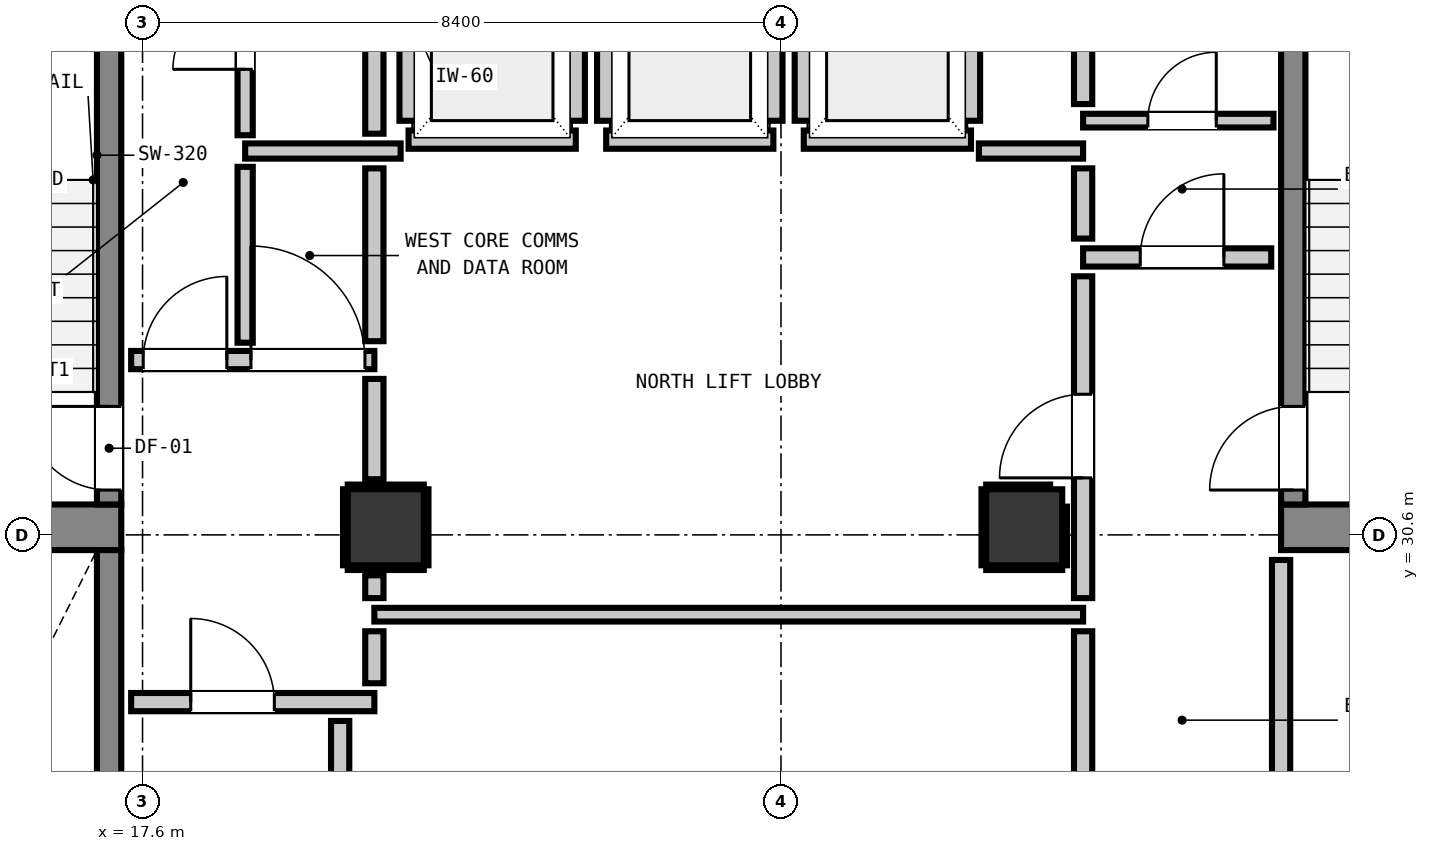
"""IFC4 building model, lengths in metres.
Left out: names, types, materials, properties, quantities, classifications, styles, units other than length and angle.
Written with IfcOpenShell. Run it as: python <this file> out.ifc"""

import sys

from ifc_helpers import new_model, si_unit, direction, frame, frame_2d, origin, origin_2d, place, context, subcontext, project, spatial, rectangle, extrude, element, fill, save


model = new_model("IFC4")
c1 = context("Model", 3, precision=1e-05, world=origin(), true_north=direction((0.0, 1.0)))
c2 = subcontext(c1, "Body", "Model", "MODEL_VIEW")
j1 = project(units=[si_unit("LENGTHUNIT", "METRE"), si_unit("PLANEANGLEUNIT", "RADIAN")], contexts=[c1])
p1 = place(None, origin())
s1 = spatial("IfcSite", under=j1, at=p1, CompositionType="ELEMENT")
p2 = place(p1, origin())
s2 = spatial("IfcBuilding", under=s1, at=p2, CompositionType="ELEMENT")
p3 = place(p2, frame((0.0, 0.0, 35.28)))
s3 = spatial("IfcBuildingStorey", under=s2, at=p3, CompositionType="ELEMENT", Elevation=35.28)
for number, where, z_axis, x_axis in (
    (1, (13.905, 30.7, 0.0), (0.0, 0.0, 1.0), (1.0, 0.0, 0.0)),
    (2, (32.58, 30.7, 0.0), (0.0, 0.0, 1.0), (1.0, 0.0, 0.0)),
):
    element("IfcWall", number, at=place(p3, frame(where, z_axis=z_axis, x_axis=x_axis)), inside=s3, PredefinedType="SHEAR", context=c2, shape_type="SweptSolid", body=[
        extrude(rectangle(XDim=3.415, YDim=0.6, at=frame_2d((1.708, 0.0))), origin(), (0.0, 0.0, 1.0), 3.32),
    ])
p4 = place(p3, frame((17.16, 31.0, 0.0), z_axis=(0.0, 0.0, 1.0), x_axis=(0.0, 1.0, 0.0)))
e3 = element("IfcWall", 3, at=p4, inside=s3, PredefinedType="SHEAR", context=c2, shape_type="SweptSolid", body=[
    extrude(rectangle(XDim=7.8, YDim=0.32, at=frame_2d((3.9, 0.0))), origin(), (0.0, 0.0, 1.0), 3.32),
])
p5 = place(p4, frame((0.19, 0.0, 0.0)))
e4 = element("IfcOpeningElement", 4, at=p5, cuts=e3, PredefinedType="OPENING", context=c2, shape_type="SweptSolid", body=[
    extrude(rectangle(XDim=1.1, YDim=2.15, at=frame_2d((0.55, 1.075))), frame((0.0, 0.17, 0.0), z_axis=(0.0, -1.0, 0.0), x_axis=(1.0, 0.0, 0.0)), (0.0, 0.0, 1.0), 0.34),
])
p6 = place(p3, frame((17.16, 22.6, 0.0), z_axis=(0.0, 0.0, 1.0), x_axis=(0.0, 1.0, 0.0)))
e5 = element("IfcWall", 5, at=p6, inside=s3, PredefinedType="SHEAR", context=c2, shape_type="SweptSolid", body=[
    extrude(rectangle(XDim=7.8, YDim=0.32, at=frame_2d((3.9, 0.0))), origin(), (0.0, 0.0, 1.0), 3.32),
])
p7 = place(p6, frame((0.19, 0.0, 0.0)))
e6 = element("IfcOpeningElement", 6, at=p7, cuts=e5, PredefinedType="OPENING", context=c2, shape_type="SweptSolid", body=[
    extrude(rectangle(XDim=1.1, YDim=2.15, at=frame_2d((0.55, 1.075))), frame((0.0, 0.17, 0.0), z_axis=(0.0, -1.0, 0.0), x_axis=(1.0, 0.0, 0.0)), (0.0, 0.0, 1.0), 0.34),
])
p8 = place(p3, frame((32.74, 31.0, 0.0), z_axis=(0.0, 0.0, 1.0), x_axis=(0.0, 1.0, 0.0)))
e7 = element("IfcWall", 7, at=p8, inside=s3, PredefinedType="SHEAR", context=c2, shape_type="SweptSolid", body=[
    extrude(rectangle(XDim=7.8, YDim=0.32, at=frame_2d((3.9, 0.0))), origin(), (0.0, 0.0, 1.0), 3.32),
])
p9 = place(p8, frame((0.19, 0.0, 0.0)))
e8 = element("IfcOpeningElement", 8, at=p9, cuts=e7, PredefinedType="OPENING", context=c2, shape_type="SweptSolid", body=[
    extrude(rectangle(XDim=1.1, YDim=2.15, at=frame_2d((0.55, 1.075))), frame((0.0, 0.17, 0.0), z_axis=(0.0, -1.0, 0.0), x_axis=(1.0, 0.0, 0.0)), (0.0, 0.0, 1.0), 0.34),
])
for number, where, z_axis, x_axis in (
    (9, (20.8, 30.7, 0.0), (0.0, 0.0, 1.0), (1.0, 0.0, 0.0)),
    (10, (29.2, 30.7, 0.0), (0.0, 0.0, 1.0), (1.0, 0.0, 0.0)),
):
    element("IfcColumn", number, at=place(p3, frame(where, z_axis=z_axis, x_axis=x_axis)), inside=s3, PredefinedType="COLUMN", context=c2, shape_type="SweptSolid", body=[
        extrude(rectangle(XDim=1.0, YDim=1.0, at=origin_2d()), origin(), (0.0, 0.0, 1.0), 3.32),
    ])
p10 = place(p3, frame((21.1, 35.8, 0.0), z_axis=(0.0, 0.0, 1.0), x_axis=(1.0, 0.0, 0.0)))
e11 = element("IfcWall", 11, at=p10, inside=s3, PredefinedType="PARTITIONING", context=c2, shape_type="SweptSolid", body=[
    extrude(rectangle(XDim=2.2, YDim=0.24, at=frame_2d((1.1, 0.0))), origin(), (0.0, 0.0, 1.0), 3.06),
])
p11 = place(p3, frame((21.1, 36.048, 0.0), z_axis=(0.0, 0.0, 1.0), x_axis=(0.0, 1.0, 0.0)))
e12 = element("IfcWall", 12, at=p11, inside=s3, PredefinedType="PARTITIONING", context=c2, shape_type="SweptSolid", body=[
    extrude(rectangle(XDim=2.104, YDim=0.24, at=frame_2d((1.052, 0.0))), origin(), (0.0, 0.0, 1.0), 2.295),
])
p12 = place(p3, frame((23.3, 36.048, 0.0), z_axis=(0.0, 0.0, 1.0), x_axis=(0.0, 1.0, 0.0)))
e13 = element("IfcWall", 13, at=p12, inside=s3, PredefinedType="PARTITIONING", context=c2, shape_type="SweptSolid", body=[
    extrude(rectangle(XDim=2.104, YDim=0.24, at=frame_2d((1.052, 0.0))), origin(), (0.0, 0.0, 1.0), 3.06),
])
p13 = place(p3, frame((23.7, 35.8, 0.0), z_axis=(0.0, 0.0, 1.0), x_axis=(1.0, 0.0, 0.0)))
e14 = element("IfcWall", 14, at=p13, inside=s3, PredefinedType="PARTITIONING", context=c2, shape_type="SweptSolid", body=[
    extrude(rectangle(XDim=2.2, YDim=0.24, at=frame_2d((1.1, 0.0))), origin(), (0.0, 0.0, 1.0), 3.06),
])
for number, where, z_axis, x_axis in (
    (15, (23.7, 36.048, 0.0), (0.0, 0.0, 1.0), (0.0, 1.0, 0.0)),
    (16, (25.9, 36.048, 0.0), (0.0, 0.0, 1.0), (0.0, 1.0, 0.0)),
):
    element("IfcWall", number, at=place(p3, frame(where, z_axis=z_axis, x_axis=x_axis)), inside=s3, PredefinedType="PARTITIONING", context=c2, shape_type="SweptSolid", body=[
        extrude(rectangle(XDim=2.104, YDim=0.24, at=frame_2d((1.052, 0.0))), origin(), (0.0, 0.0, 1.0), 3.06),
    ])
p14 = place(p3, frame((26.3, 35.8, 0.0), z_axis=(0.0, 0.0, 1.0), x_axis=(1.0, 0.0, 0.0)))
e17 = element("IfcWall", 17, at=p14, inside=s3, PredefinedType="PARTITIONING", context=c2, shape_type="SweptSolid", body=[
    extrude(rectangle(XDim=2.2, YDim=0.24, at=frame_2d((1.1, 0.0))), origin(), (0.0, 0.0, 1.0), 3.06),
])
for number, where, z_axis, x_axis in (
    (18, (26.3, 36.048, 0.0), (0.0, 0.0, 1.0), (0.0, 1.0, 0.0)),
    (19, (28.5, 36.048, 0.0), (0.0, 0.0, 1.0), (0.0, 1.0, 0.0)),
):
    element("IfcWall", number, at=place(p3, frame(where, z_axis=z_axis, x_axis=x_axis)), inside=s3, PredefinedType="PARTITIONING", context=c2, shape_type="SweptSolid", body=[
        extrude(rectangle(XDim=2.104, YDim=0.24, at=frame_2d((1.052, 0.0))), origin(), (0.0, 0.0, 1.0), 3.06),
    ])
p15 = place(p3, frame((17.45, 28.4, 0.0), z_axis=(0.0, 0.0, 1.0), x_axis=(1.0, 0.0, 0.0)))
e20 = element("IfcWall", 20, at=p15, inside=s3, PredefinedType="PARTITIONING", context=c2, shape_type="SweptSolid", body=[
    extrude(rectangle(XDim=3.2, YDim=0.24, at=frame_2d((1.6, 0.0))), origin(), (0.0, 0.0, 1.0), 3.06),
])
p16 = place(p15, frame((0.784, 0.0, 0.0)))
e21 = element("IfcOpeningElement", 21, at=p16, cuts=e20, PredefinedType="OPENING", context=c2, shape_type="SweptSolid", body=[
    extrude(rectangle(XDim=1.1, YDim=2.15, at=frame_2d((0.55, 1.075))), frame((0.0, 0.13, 0.0), z_axis=(0.0, -1.0, 0.0), x_axis=(1.0, 0.0, 0.0)), (0.0, 0.0, 1.0), 0.26),
])
p17 = place(p3, frame((17.45, 32.9, 0.0), z_axis=(0.0, 0.0, 1.0), x_axis=(1.0, 0.0, 0.0)))
e22 = element("IfcWall", 22, at=p17, inside=s3, PredefinedType="PARTITIONING", context=c2, shape_type="SweptSolid", body=[
    extrude(rectangle(XDim=3.2, YDim=0.24, at=frame_2d((1.6, 0.0))), origin(), (0.0, 0.0, 1.0), 3.06),
])
p18 = place(p17, frame((0.159, 0.0, 0.0)))
e23 = element("IfcOpeningElement", 23, at=p18, cuts=e22, PredefinedType="OPENING", context=c2, shape_type="SweptSolid", body=[
    extrude(rectangle(XDim=1.1, YDim=2.15, at=frame_2d((0.55, 1.075))), frame((0.0, 0.13, 0.0), z_axis=(0.0, -1.0, 0.0), x_axis=(1.0, 0.0, 0.0)), (0.0, 0.0, 1.0), 0.26),
])
p19 = place(p17, frame((1.576, 0.0, 0.0)))
e24 = element("IfcOpeningElement", 24, at=p19, cuts=e22, PredefinedType="OPENING", context=c2, shape_type="SweptSolid", body=[
    extrude(rectangle(XDim=1.5, YDim=2.15, at=frame_2d((0.75, 1.075))), frame((0.0, 0.13, 0.0), z_axis=(0.0, -1.0, 0.0), x_axis=(1.0, 0.0, 0.0)), (0.0, 0.0, 1.0), 0.26),
])
p20 = place(p3, frame((29.975, 34.25, 0.0), z_axis=(0.0, 0.0, 1.0), x_axis=(1.0, 0.0, 0.0)))
e25 = element("IfcWall", 25, at=p20, inside=s3, PredefinedType="PARTITIONING", context=c2, shape_type="SweptSolid", body=[
    extrude(rectangle(XDim=2.475, YDim=0.24, at=frame_2d((1.237, 0.0))), origin(), (0.0, 0.0, 1.0), 3.06),
])
p21 = place(p20, frame((0.752, 0.0, 0.0)))
e26 = element("IfcOpeningElement", 26, at=p21, cuts=e25, PredefinedType="OPENING", context=c2, shape_type="SweptSolid", body=[
    extrude(rectangle(XDim=1.1, YDim=2.15, at=frame_2d((0.55, 1.075))), frame((0.0, 0.13, 0.0), z_axis=(0.0, -1.0, 0.0), x_axis=(1.0, 0.0, 0.0)), (0.0, 0.0, 1.0), 0.26),
])
p22 = place(p3, frame((18.95, 35.65, 0.0), z_axis=(0.0, 0.0, 1.0), x_axis=(1.0, 0.0, 0.0)))
e27 = element("IfcWall", 27, at=p22, inside=s3, PredefinedType="PARTITIONING", context=c2, shape_type="SweptSolid", body=[
    extrude(rectangle(XDim=2.046, YDim=0.2, at=frame_2d((1.023, 0.0))), origin(), (0.0, 0.0, 1.0), 3.06),
])
p23 = place(p3, frame((28.604, 35.65, 0.0), z_axis=(0.0, 0.0, 1.0), x_axis=(1.0, 0.0, 0.0)))
e28 = element("IfcWall", 28, at=p23, inside=s3, PredefinedType="PARTITIONING", context=c2, shape_type="SweptSolid", body=[
    extrude(rectangle(XDim=1.371, YDim=0.2, at=frame_2d((0.686, 0.0))), origin(), (0.0, 0.0, 1.0), 3.06),
])
p24 = place(p3, frame((20.65, 29.55, 0.0), z_axis=(0.0, 0.0, 1.0), x_axis=(1.0, 0.0, 0.0)))
e29 = element("IfcWall", 29, at=p24, inside=s3, PredefinedType="PARTITIONING", context=c2, shape_type="SweptSolid", body=[
    extrude(rectangle(XDim=9.325, YDim=0.18, at=frame_2d((4.663, 0.0))), origin(), (0.0, 0.0, 1.0), 3.06),
])
p25 = place(p3, frame((29.975, 36.05, 0.0), z_axis=(0.0, 0.0, 1.0), x_axis=(1.0, 0.0, 0.0)))
e30 = element("IfcWall", 30, at=p25, inside=s3, PredefinedType="PARTITIONING", context=c2, shape_type="SweptSolid", body=[
    extrude(rectangle(XDim=2.505, YDim=0.18, at=frame_2d((1.252, 0.0))), origin(), (0.0, 0.0, 1.0), 3.06),
])
p26 = place(p25, frame((0.852, 0.0, 0.0)))
e31 = element("IfcOpeningElement", 31, at=p26, cuts=e30, PredefinedType="OPENING", context=c2, shape_type="SweptSolid", body=[
    extrude(rectangle(XDim=0.9, YDim=2.1, at=frame_2d((0.45, 1.05))), frame((0.0, 0.1, 0.0), z_axis=(0.0, -1.0, 0.0), x_axis=(1.0, 0.0, 0.0)), (0.0, 0.0, 1.0), 0.2),
])
p27 = place(p3, frame((20.2, 22.586, 0.0), z_axis=(0.0, 0.0, 1.0), x_axis=(0.0, 1.0, 0.0)))
e32 = element("IfcWall", 32, at=p27, inside=s3, PredefinedType="PARTITIONING", context=c2, shape_type="SweptSolid", body=[
    extrude(rectangle(XDim=5.566, YDim=0.24, at=frame_2d((2.783, 0.0))), origin(), (0.0, 0.0, 1.0), 3.06),
])
p28 = place(p3, frame((20.65, 28.648, 0.0), z_axis=(0.0, 0.0, 1.0), x_axis=(0.0, 1.0, 0.0)))
e33 = element("IfcWall", 33, at=p28, inside=s3, PredefinedType="PARTITIONING", context=c2, shape_type="SweptSolid", body=[
    extrude(rectangle(XDim=0.684, YDim=0.24, at=frame_2d((0.342, 0.0))), origin(), (0.0, 0.0, 1.0), 2.295),
])
p29 = place(p3, frame((20.65, 29.768, 0.0), z_axis=(0.0, 0.0, 1.0), x_axis=(0.0, 1.0, 0.0)))
e34 = element("IfcWall", 34, at=p29, inside=s3, PredefinedType="PARTITIONING", context=c2, shape_type="SweptSolid", body=[
    extrude(rectangle(XDim=0.3, YDim=0.24, at=frame_2d((0.15, 0.0))), origin(), (0.0, 0.0, 1.0), 2.295),
])
p30 = place(p3, frame((20.65, 31.332, 0.0), z_axis=(0.0, 0.0, 1.0), x_axis=(0.0, 1.0, 0.0)))
e35 = element("IfcWall", 35, at=p30, inside=s3, PredefinedType="PARTITIONING", context=c2, shape_type="SweptSolid", body=[
    extrude(rectangle(XDim=1.32, YDim=0.24, at=frame_2d((0.66, 0.0))), origin(), (0.0, 0.0, 1.0), 2.295),
])
p31 = place(p3, frame((20.65, 33.148, 0.0), z_axis=(0.0, 0.0, 1.0), x_axis=(0.0, 1.0, 0.0)))
e36 = element("IfcWall", 36, at=p31, inside=s3, PredefinedType="PARTITIONING", context=c2, shape_type="SweptSolid", body=[
    extrude(rectangle(XDim=2.274, YDim=0.24, at=frame_2d((1.137, 0.0))), origin(), (0.0, 0.0, 1.0), 2.295),
])
p32 = place(p3, frame((20.65, 35.878, 0.0), z_axis=(0.0, 0.0, 1.0), x_axis=(0.0, 1.0, 0.0)))
e37 = element("IfcWall", 37, at=p32, inside=s3, PredefinedType="PARTITIONING", context=c2, shape_type="SweptSolid", body=[
    extrude(rectangle(XDim=2.674, YDim=0.24, at=frame_2d((1.337, 0.0))), origin(), (0.0, 0.0, 1.0), 2.295),
])
p33 = place(p3, frame((29.975, 25.648, 0.0), z_axis=(0.0, 0.0, 1.0), x_axis=(0.0, 1.0, 0.0)))
e38 = element("IfcWall", 38, at=p33, inside=s3, PredefinedType="PARTITIONING", context=c2, shape_type="SweptSolid", body=[
    extrude(rectangle(XDim=3.684, YDim=0.24, at=frame_2d((1.842, 0.0))), origin(), (0.0, 0.0, 1.0), 3.06),
])
p34 = place(p3, frame((29.975, 29.768, 0.0), z_axis=(0.0, 0.0, 1.0), x_axis=(0.0, 1.0, 0.0)))
e39 = element("IfcWall", 39, at=p34, inside=s3, PredefinedType="PARTITIONING", context=c2, shape_type="SweptSolid", body=[
    extrude(rectangle(XDim=4.234, YDim=0.24, at=frame_2d((2.117, 0.0))), origin(), (0.0, 0.0, 1.0), 3.06),
])
p35 = place(p34, frame((1.582, 0.0, 0.0)))
e40 = element("IfcOpeningElement", 40, at=p35, cuts=e39, PredefinedType="OPENING", context=c2, shape_type="SweptSolid", body=[
    extrude(rectangle(XDim=1.1, YDim=2.15, at=frame_2d((0.55, 1.075))), frame((0.0, 0.13, 0.0), z_axis=(0.0, -1.0, 0.0), x_axis=(1.0, 0.0, 0.0)), (0.0, 0.0, 1.0), 0.26),
])
p36 = place(p3, frame((29.975, 34.498, 0.0), z_axis=(0.0, 0.0, 1.0), x_axis=(0.0, 1.0, 0.0)))
e41 = element("IfcWall", 41, at=p36, inside=s3, PredefinedType="PARTITIONING", context=c2, shape_type="SweptSolid", body=[
    extrude(rectangle(XDim=0.924, YDim=0.24, at=frame_2d((0.462, 0.0))), origin(), (0.0, 0.0, 1.0), 3.06),
])
p37 = place(p3, frame((29.975, 36.268, 0.0), z_axis=(0.0, 0.0, 1.0), x_axis=(0.0, 1.0, 0.0)))
e42 = element("IfcWall", 42, at=p37, inside=s3, PredefinedType="PARTITIONING", context=c2, shape_type="SweptSolid", body=[
    extrude(rectangle(XDim=2.284, YDim=0.24, at=frame_2d((1.142, 0.0))), origin(), (0.0, 0.0, 1.0), 3.06),
])
p38 = place(p3, frame((32.58, 25.648, 0.0), z_axis=(0.0, 0.0, 1.0), x_axis=(0.0, 1.0, 0.0)))
e43 = element("IfcWall", 43, at=p38, inside=s3, PredefinedType="PARTITIONING", context=c2, shape_type="SweptSolid", body=[
    extrude(rectangle(XDim=4.622, YDim=0.24, at=frame_2d((2.311, 0.0))), origin(), (0.0, 0.0, 1.0), 3.06),
])
p39 = place(p3, frame((18.95, 33.128, 0.0), z_axis=(0.0, 0.0, 1.0), x_axis=(0.0, 1.0, 0.0)))
e44 = element("IfcWall", 44, at=p39, inside=s3, PredefinedType="PARTITIONING", context=c2, shape_type="SweptSolid", body=[
    extrude(rectangle(XDim=2.314, YDim=0.2, at=frame_2d((1.157, 0.0))), origin(), (0.0, 0.0, 1.0), 3.06),
])
p40 = place(p3, frame((18.95, 35.858, 0.0), z_axis=(0.0, 0.0, 1.0), x_axis=(0.0, 1.0, 0.0)))
e45 = element("IfcWall", 45, at=p40, inside=s3, PredefinedType="PARTITIONING", context=c2, shape_type="SweptSolid", body=[
    extrude(rectangle(XDim=2.714, YDim=0.2, at=frame_2d((1.357, 0.0))), origin(), (0.0, 0.0, 1.0), 3.06),
])
p41 = place(p40, frame((0.867, 0.0, 0.0)))
e46 = element("IfcOpeningElement", 46, at=p41, cuts=e45, PredefinedType="OPENING", context=c2, shape_type="SweptSolid", body=[
    extrude(rectangle(XDim=0.95, YDim=2.1, at=frame_2d((0.475, 1.05))), frame((0.0, 0.11, 0.0), z_axis=(0.0, -1.0, 0.0), x_axis=(1.0, 0.0, 0.0)), (0.0, 0.0, 1.0), 0.22),
])
for number, where, z_axis, x_axis in (
    (47, (20.3, 30.168, 0.0), (0.0, 0.0, 1.0), (1.0, 0.0, 0.0)),
    (48, (20.3, 31.232, 0.0), (0.0, 0.0, 1.0), (1.0, 0.0, 0.0)),
    (49, (20.268, 30.2, 0.0), (0.0, 0.0, 1.0), (0.0, 1.0, 0.0)),
    (50, (21.332, 30.2, 0.0), (0.0, 0.0, 1.0), (0.0, 1.0, 0.0)),
    (51, (28.7, 30.168, 0.0), (0.0, 0.0, 1.0), (1.0, 0.0, 0.0)),
):
    element("IfcWall", number, at=place(p3, frame(where, z_axis=z_axis, x_axis=x_axis)), inside=s3, PredefinedType="PARTITIONING", context=c2, shape_type="SweptSolid", body=[
        extrude(rectangle(XDim=1.0, YDim=0.06, at=frame_2d((0.5, 0.0))), origin(), (0.0, 0.0, 1.0), 1.45),
    ])
p42 = place(p3, frame((28.7, 31.232, 0.0), z_axis=(0.0, 0.0, 1.0), x_axis=(1.0, 0.0, 0.0)))
e52 = element("IfcWall", 52, at=p42, inside=s3, PredefinedType="PARTITIONING", context=c2, shape_type="SweptSolid", body=[
    extrude(rectangle(XDim=0.841, YDim=0.06, at=frame_2d((0.42, 0.0))), origin(), (0.0, 0.0, 1.0), 1.45),
])
p43 = place(p3, frame((28.668, 30.2, 0.0), z_axis=(0.0, 0.0, 1.0), x_axis=(0.0, 1.0, 0.0)))
e53 = element("IfcWall", 53, at=p43, inside=s3, PredefinedType="PARTITIONING", context=c2, shape_type="SweptSolid", body=[
    extrude(rectangle(XDim=1.0, YDim=0.06, at=frame_2d((0.5, 0.0))), origin(), (0.0, 0.0, 1.0), 1.45),
])
p44 = place(p3, frame((29.732, 30.2, 0.0), z_axis=(0.0, 0.0, 1.0), x_axis=(0.0, 1.0, 0.0)))
e54 = element("IfcWall", 54, at=p44, inside=s3, PredefinedType="PARTITIONING", context=c2, shape_type="SweptSolid", body=[
    extrude(rectangle(XDim=0.772, YDim=0.06, at=frame_2d((0.386, 0.0))), origin(), (0.0, 0.0, 1.0), 1.45),
])
p45 = place(p5, origin())
e55 = element("IfcDoor", 55, at=p45, inside=s3, OperationType="SINGLE_SWING_RIGHT", PredefinedType="DOOR", context=c2, shape_type="SweptSolid", body=[
    extrude(rectangle(XDim=1.1, YDim=2.15, at=frame_2d((0.55, 1.075))), frame((0.0, 0.025, 0.0), z_axis=(0.0, -1.0, 0.0), x_axis=(1.0, 0.0, 0.0)), (0.0, 0.0, 1.0), 0.05),
])
fill(e4, e55)
p46 = place(p9, origin())
e56 = element("IfcDoor", 56, at=p46, inside=s3, OperationType="SINGLE_SWING_LEFT", PredefinedType="DOOR", context=c2, shape_type="SweptSolid", body=[
    extrude(rectangle(XDim=1.1, YDim=2.15, at=frame_2d((0.55, 1.075))), frame((0.0, 0.025, 0.0), z_axis=(0.0, -1.0, 0.0), x_axis=(1.0, 0.0, 0.0)), (0.0, 0.0, 1.0), 0.05),
])
fill(e8, e56)
p47 = place(p16, origin())
e57 = element("IfcDoor", 57, at=p47, inside=s3, OperationType="SINGLE_SWING_LEFT", PredefinedType="DOOR", context=c2, shape_type="SweptSolid", body=[
    extrude(rectangle(XDim=1.1, YDim=2.15, at=frame_2d((0.55, 1.075))), frame((0.0, 0.025, 0.0), z_axis=(0.0, -1.0, 0.0), x_axis=(1.0, 0.0, 0.0)), (0.0, 0.0, 1.0), 0.05),
])
fill(e21, e57)
p48 = place(p18, origin())
e58 = element("IfcDoor", 58, at=p48, inside=s3, OperationType="SINGLE_SWING_RIGHT", PredefinedType="DOOR", context=c2, shape_type="SweptSolid", body=[
    extrude(rectangle(XDim=1.1, YDim=2.15, at=frame_2d((0.55, 1.075))), frame((0.0, 0.025, 0.0), z_axis=(0.0, -1.0, 0.0), x_axis=(1.0, 0.0, 0.0)), (0.0, 0.0, 1.0), 0.05),
])
fill(e23, e58)
p49 = place(p35, origin())
e59 = element("IfcDoor", 59, at=p49, inside=s3, OperationType="SINGLE_SWING_LEFT", PredefinedType="DOOR", context=c2, shape_type="SweptSolid", body=[
    extrude(rectangle(XDim=1.1, YDim=2.15, at=frame_2d((0.55, 1.075))), frame((0.0, 0.025, 0.0), z_axis=(0.0, -1.0, 0.0), x_axis=(1.0, 0.0, 0.0)), (0.0, 0.0, 1.0), 0.05),
])
fill(e40, e59)
p50 = place(p21, origin())
e60 = element("IfcDoor", 60, at=p50, inside=s3, OperationType="SINGLE_SWING_RIGHT", PredefinedType="DOOR", context=c2, shape_type="SweptSolid", body=[
    extrude(rectangle(XDim=1.1, YDim=2.15, at=frame_2d((0.55, 1.075))), frame((0.0, 0.025, 0.0), z_axis=(0.0, -1.0, 0.0), x_axis=(1.0, 0.0, 0.0)), (0.0, 0.0, 1.0), 0.05),
])
fill(e26, e60)
p51 = place(p19, origin())
e61 = element("IfcDoor", 61, at=p51, inside=s3, OperationType="SINGLE_SWING_LEFT", PredefinedType="DOOR", context=c2, shape_type="SweptSolid", body=[
    extrude(rectangle(XDim=1.5, YDim=2.15, at=frame_2d((0.75, 1.075))), frame((0.0, 0.025, 0.0), z_axis=(0.0, -1.0, 0.0), x_axis=(1.0, 0.0, 0.0)), (0.0, 0.0, 1.0), 0.05),
])
fill(e24, e61)
p52 = place(p26, origin())
e62 = element("IfcDoor", 62, at=p52, inside=s3, OperationType="SINGLE_SWING_RIGHT", PredefinedType="DOOR", context=c2, shape_type="SweptSolid", body=[
    extrude(rectangle(XDim=0.9, YDim=2.1, at=frame_2d((0.45, 1.05))), frame((0.0, 0.025, 0.0), z_axis=(0.0, -1.0, 0.0), x_axis=(1.0, 0.0, 0.0)), (0.0, 0.0, 1.0), 0.05),
])
fill(e31, e62)
p53 = place(p41, origin())
e63 = element("IfcDoor", 63, at=p53, inside=s3, OperationType="SINGLE_SWING_LEFT", PredefinedType="DOOR", context=c2, shape_type="SweptSolid", body=[
    extrude(rectangle(XDim=0.95, YDim=2.1, at=frame_2d((0.475, 1.05))), frame((0.0, 0.025, 0.0), z_axis=(0.0, -1.0, 0.0), x_axis=(1.0, 0.0, 0.0)), (0.0, 0.0, 1.0), 0.05),
])
fill(e46, e63)
save(model, sys.argv[1])
